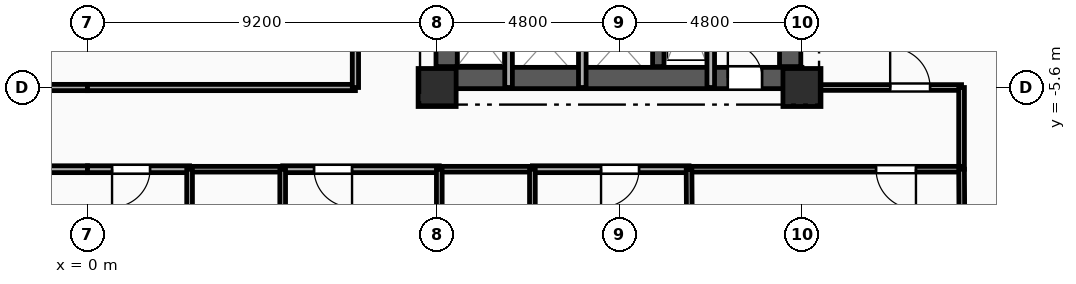
"""IFC4 building model, lengths in metres.
Left out: names, types, materials, properties, quantities, classifications, styles, units other than length and angle.
Written with IfcOpenShell. Run it as: python <this file> out.ifc"""

import sys

from ifc_helpers import new_model, si_unit, direction, frame, frame_2d, origin, origin_2d, place, context, subcontext, project, spatial, rectangle, extrude, element, fill, save


model = new_model("IFC4")
c1 = context("Model", 3, precision=1e-05, world=origin(), true_north=direction((0.0, 1.0)))
c2 = subcontext(c1, "Body", "Model", "MODEL_VIEW")
j1 = project(units=[si_unit("LENGTHUNIT", "METRE"), si_unit("PLANEANGLEUNIT", "RADIAN")], contexts=[c1])
p1 = place(None, origin())
s1 = spatial("IfcSite", under=j1, at=p1, CompositionType="ELEMENT")
p2 = place(p1, origin())
s2 = spatial("IfcBuilding", under=s1, at=p2, CompositionType="ELEMENT")
p3 = place(p2, frame((0.0, 0.0, 115.85)))
s3 = spatial("IfcBuildingStorey", under=s2, at=p3, CompositionType="ELEMENT", Elevation=115.85)
for number, where, z_axis, x_axis in (
    (1, (9.2, -5.6, 0.0), (0.0, 0.0, 1.0), (1.0, 0.0, 0.0)),
    (2, (18.8, -5.6, 0.0), (0.0, 0.0, 1.0), (1.0, 0.0, 0.0)),
):
    element("IfcColumn", number, at=place(p3, frame(where, z_axis=z_axis, x_axis=x_axis)), inside=s3, PredefinedType="COLUMN", context=c2, shape_type="SweptSolid", body=[
        extrude(rectangle(XDim=1.0, YDim=1.0, at=origin_2d()), origin(), (0.0, 0.0, 1.0), 3.35),
    ])
p4 = place(p3, frame((9.2, -5.35, 0.0), z_axis=(0.0, 0.0, 1.0), x_axis=(1.0, 0.0, 0.0)))
e3 = element("IfcWall", 3, at=p4, inside=s3, PredefinedType="SHEAR", context=c2, shape_type="SweptSolid", body=[
    extrude(rectangle(XDim=9.6, YDim=0.56, at=frame_2d((4.8, 0.0))), origin(), (0.0, 0.0, 1.0), 3.045),
])
p5 = place(p4, frame((7.65, 0.0, 0.0)))
e4 = element("IfcOpeningElement", 4, at=p5, cuts=e3, PredefinedType="OPENING", context=c2, shape_type="SweptSolid", body=[
    extrude(rectangle(XDim=0.9, YDim=2.1, at=frame_2d((0.45, 1.05))), frame((0.0, 0.29, 0.0), z_axis=(0.0, -1.0, 0.0), x_axis=(1.0, 0.0, 0.0)), (0.0, 0.0, 1.0), 0.58),
])
p6 = place(p3, frame((9.45, -5.05, 0.0), z_axis=(0.0, 0.0, 1.0), x_axis=(0.0, 1.0, 0.0)))
e5 = element("IfcWall", 5, at=p6, inside=s3, PredefinedType="SHEAR", context=c2, shape_type="SweptSolid", body=[
    extrude(rectangle(XDim=10.1, YDim=0.56, at=frame_2d((5.05, 0.0))), origin(), (0.0, 0.0, 1.0), 3.045),
])
p7 = place(p6, frame((7.15, 0.0, 0.0)))
e6 = element("IfcOpeningElement", 6, at=p7, cuts=e5, PredefinedType="OPENING", context=c2, shape_type="SweptSolid", body=[
    extrude(rectangle(XDim=0.9, YDim=2.1, at=frame_2d((0.45, 1.05))), frame((0.0, 0.29, 0.0), z_axis=(0.0, -1.0, 0.0), x_axis=(1.0, 0.0, 0.0)), (0.0, 0.0, 1.0), 0.58),
])
p8 = place(p6, frame((2.4, 0.0, 0.0)))
e7 = element("IfcOpeningElement", 7, at=p8, cuts=e5, PredefinedType="OPENING", context=c2, shape_type="SweptSolid", body=[
    extrude(rectangle(XDim=1.2, YDim=2.15, at=frame_2d((0.6, 1.075))), frame((0.0, 0.29, 0.0), z_axis=(0.0, -1.0, 0.0), x_axis=(1.0, 0.0, 0.0)), (0.0, 0.0, 1.0), 0.58),
])
p9 = place(p3, frame((18.49, -5.05, 0.0), z_axis=(0.0, 0.0, 1.0), x_axis=(0.0, 1.0, 0.0)))
e8 = element("IfcWall", 8, at=p9, inside=s3, PredefinedType="SHEAR", context=c2, shape_type="SweptSolid", body=[
    extrude(rectangle(XDim=10.1, YDim=0.56, at=frame_2d((5.05, 0.0))), origin(), (0.0, 0.0, 1.0), 3.045),
])
p10 = place(p3, frame((15.02, -5.05, 0.0), z_axis=(0.0, 0.0, 1.0), x_axis=(0.0, 1.0, 0.0)))
e9 = element("IfcWall", 9, at=p10, inside=s3, PredefinedType="SHEAR", context=c2, shape_type="SweptSolid", body=[
    extrude(rectangle(XDim=10.1, YDim=0.3, at=frame_2d((5.05, 0.0))), origin(), (0.0, 0.0, 1.0), 3.045),
])
p11 = place(p3, frame((16.4, -2.11, 0.0), z_axis=(0.0, 0.0, 1.0), x_axis=(0.0, -1.0, 0.0)))
e10 = element("IfcWall", 10, at=p11, inside=s3, PredefinedType="PARTITIONING", context=c2, shape_type="SweptSolid", body=[
    extrude(rectangle(XDim=3.49, YDim=0.2, at=frame_2d((1.745, 0.0))), origin(), (0.0, 0.0, 1.0), 3.045),
])
for number, where, z_axis, x_axis in (
    (11, (11.08, -5.6, 0.0), (0.0, 0.0, 1.0), (0.0, 1.0, 0.0)),
    (12, (13.02, -5.6, 0.0), (0.0, 0.0, 1.0), (0.0, 1.0, 0.0)),
):
    element("IfcWall", number, at=place(p3, frame(where, z_axis=z_axis, x_axis=x_axis)), inside=s3, PredefinedType="PARTITIONING", context=c2, shape_type="SweptSolid", body=[
        extrude(rectangle(XDim=2.25, YDim=0.2, at=frame_2d((1.125, 0.0))), origin(), (0.0, 0.0, 1.0), 3.045),
    ])
p12 = place(p3, frame((0.0, -7.75, 0.0), z_axis=(0.0, 0.0, 1.0), x_axis=(-1.0, 0.0, 0.0)))
e13 = element("IfcWall", 13, at=p12, inside=s3, PredefinedType="PARTITIONING", context=c2, shape_type="SweptSolid", body=[
    extrude(rectangle(XDim=1.436, YDim=0.18, at=frame_2d((0.718, 0.0))), origin(), (0.0, 0.0, 1.0), 3.045),
])
p13 = place(p3, frame((-7.05, -5.6, 0.0), z_axis=(0.0, 0.0, 1.0), x_axis=(1.0, 0.0, 0.0)))
e14 = element("IfcWall", 14, at=p13, inside=s3, PredefinedType="PARTITIONING", context=c2, shape_type="SweptSolid", body=[
    extrude(rectangle(XDim=7.05, YDim=0.165, at=frame_2d((3.525, 0.0))), origin(), (0.0, 0.0, 1.0), 2.53),
])
p14 = place(p13, frame((4.728, 0.0, 0.0)))
e15 = element("IfcOpeningElement", 15, at=p14, cuts=e14, PredefinedType="OPENING", context=c2, shape_type="SweptSolid", body=[
    extrude(rectangle(XDim=1.15, YDim=2.15, at=frame_2d((0.575, 1.075))), frame((0.0, 0.093, 0.0), z_axis=(0.0, -1.0, 0.0), x_axis=(1.0, 0.0, 0.0)), (0.0, 0.0, 1.0), 0.185),
])
p15 = place(p3, frame((18.8, -5.6, 0.0), z_axis=(0.0, 0.0, 1.0), x_axis=(1.0, 0.0, 0.0)))
e16 = element("IfcWall", 16, at=p15, inside=s3, PredefinedType="PARTITIONING", context=c2, shape_type="SweptSolid", body=[
    extrude(rectangle(XDim=4.2, YDim=0.15, at=frame_2d((2.1, 0.0))), origin(), (0.0, 0.0, 1.0), 2.53),
])
p16 = place(p15, frame((2.321, 0.0, 0.0)))
e17 = element("IfcOpeningElement", 17, at=p16, cuts=e16, PredefinedType="OPENING", context=c2, shape_type="SweptSolid", body=[
    extrude(rectangle(XDim=1.05, YDim=2.15, at=frame_2d((0.525, 1.075))), frame((0.0, 0.085, 0.0), z_axis=(0.0, -1.0, 0.0), x_axis=(1.0, 0.0, 0.0)), (0.0, 0.0, 1.0), 0.17),
])
p17 = place(p3, frame((23.0, -5.6, 0.0), z_axis=(0.0, 0.0, 1.0), x_axis=(0.0, -1.0, 0.0)))
e18 = element("IfcWall", 18, at=p17, inside=s3, PredefinedType="PARTITIONING", context=c2, shape_type="SweptSolid", body=[
    extrude(rectangle(XDim=2.15, YDim=0.15, at=frame_2d((1.075, 0.0))), origin(), (0.0, 0.0, 1.0), 3.045),
])
p18 = place(p3, frame((2.686, -7.75, 0.0), z_axis=(0.0, 0.0, 1.0), x_axis=(-1.0, 0.0, 0.0)))
e19 = element("IfcWall", 19, at=p18, inside=s3, PredefinedType="PARTITIONING", context=c2, shape_type="SweptSolid", body=[
    extrude(rectangle(XDim=2.686, YDim=0.18, at=frame_2d((1.343, 0.0))), origin(), (0.0, 0.0, 1.0), 3.045),
])
p19 = place(p18, frame((1.04, 0.0, 0.0)))
e20 = element("IfcOpeningElement", 20, at=p19, cuts=e19, PredefinedType="OPENING", context=c2, shape_type="SweptSolid", body=[
    extrude(rectangle(XDim=1.0, YDim=2.15, at=frame_2d((0.5, 1.075))), frame((0.0, 0.1, 0.0), z_axis=(0.0, -1.0, 0.0), x_axis=(1.0, 0.0, 0.0)), (0.0, 0.0, 1.0), 0.2),
])
p20 = place(p3, frame((9.257, -7.75, 0.0), z_axis=(0.0, 0.0, 1.0), x_axis=(-1.0, 0.0, 0.0)))
e21 = element("IfcWall", 21, at=p20, inside=s3, PredefinedType="PARTITIONING", context=c2, shape_type="SweptSolid", body=[
    extrude(rectangle(XDim=4.121, YDim=0.18, at=frame_2d((2.061, 0.0))), origin(), (0.0, 0.0, 1.0), 3.045),
])
p21 = place(p20, frame((2.296, 0.0, 0.0)))
e22 = element("IfcOpeningElement", 22, at=p21, cuts=e21, PredefinedType="OPENING", context=c2, shape_type="SweptSolid", body=[
    extrude(rectangle(XDim=1.0, YDim=2.15, at=frame_2d((0.5, 1.075))), frame((0.0, 0.1, 0.0), z_axis=(0.0, -1.0, 0.0), x_axis=(1.0, 0.0, 0.0)), (0.0, 0.0, 1.0), 0.2),
])
p22 = place(p3, frame((5.136, -7.75, 0.0), z_axis=(0.0, 0.0, 1.0), x_axis=(-1.0, 0.0, 0.0)))
e23 = element("IfcWall", 23, at=p22, inside=s3, PredefinedType="PLUMBINGWALL", context=c2, shape_type="SweptSolid", body=[
    extrude(rectangle(XDim=2.45, YDim=0.15, at=frame_2d((1.225, 0.0))), origin(), (0.0, 0.0, 1.0), 3.045),
])
p23 = place(p3, frame((15.829, -7.75, 0.0), z_axis=(0.0, 0.0, 1.0), x_axis=(-1.0, 0.0, 0.0)))
e24 = element("IfcWall", 24, at=p23, inside=s3, PredefinedType="PARTITIONING", context=c2, shape_type="SweptSolid", body=[
    extrude(rectangle(XDim=4.122, YDim=0.18, at=frame_2d((2.061, 0.0))), origin(), (0.0, 0.0, 1.0), 3.045),
])
p24 = place(p23, frame((1.316, 0.0, 0.0)))
e25 = element("IfcOpeningElement", 25, at=p24, cuts=e24, PredefinedType="OPENING", context=c2, shape_type="SweptSolid", body=[
    extrude(rectangle(XDim=1.0, YDim=2.15, at=frame_2d((0.5, 1.075))), frame((0.0, 0.1, 0.0), z_axis=(0.0, -1.0, 0.0), x_axis=(1.0, 0.0, 0.0)), (0.0, 0.0, 1.0), 0.2),
])
p25 = place(p3, frame((11.707, -7.75, 0.0), z_axis=(0.0, 0.0, 1.0), x_axis=(-1.0, 0.0, 0.0)))
e26 = element("IfcWall", 26, at=p25, inside=s3, PredefinedType="PLUMBINGWALL", context=c2, shape_type="SweptSolid", body=[
    extrude(rectangle(XDim=2.45, YDim=0.15, at=frame_2d((1.225, 0.0))), origin(), (0.0, 0.0, 1.0), 3.045),
])
p26 = place(p3, frame((23.0, -7.75, 0.0), z_axis=(0.0, 0.0, 1.0), x_axis=(-1.0, 0.0, 0.0)))
e27 = element("IfcWall", 27, at=p26, inside=s3, PredefinedType="PARTITIONING", context=c2, shape_type="SweptSolid", body=[
    extrude(rectangle(XDim=7.171, YDim=0.15, at=frame_2d((3.585, 0.0))), origin(), (0.0, 0.0, 1.0), 3.045),
])
p27 = place(p26, frame((1.2, 0.0, 0.0)))
e28 = element("IfcOpeningElement", 28, at=p27, cuts=e27, PredefinedType="OPENING", context=c2, shape_type="SweptSolid", body=[
    extrude(rectangle(XDim=1.05, YDim=2.15, at=frame_2d((0.525, 1.075))), frame((0.0, 0.085, 0.0), z_axis=(0.0, -1.0, 0.0), x_axis=(1.0, 0.0, 0.0)), (0.0, 0.0, 1.0), 0.17),
])
p28 = place(p3, frame((0.0, -5.6, 0.0), z_axis=(0.0, 0.0, 1.0), x_axis=(1.0, 0.0, 0.0)))
e29 = element("IfcWall", 29, at=p28, inside=s3, PredefinedType="PARTITIONING", context=c2, shape_type="SweptSolid", body=[
    extrude(rectangle(XDim=7.05, YDim=0.165, at=frame_2d((3.525, 0.0))), origin(), (0.0, 0.0, 1.0), 2.53),
])
p29 = place(p3, frame((7.05, -5.6, 0.0), z_axis=(0.0, 0.0, 1.0), x_axis=(0.0, 1.0, 0.0)))
e30 = element("IfcWall", 30, at=p29, inside=s3, PredefinedType="PARTITIONING", context=c2, shape_type="SweptSolid", body=[
    extrude(rectangle(XDim=7.05, YDim=0.165, at=frame_2d((3.525, 0.0))), origin(), (0.0, 0.0, 1.0), 3.045),
])
p30 = place(p3, frame((23.044, -14.749, 0.0), z_axis=(0.0, 0.0, 1.0), x_axis=(-0.006278653971, 0.999980289058, 0.0)))
e31 = element("IfcWall", 31, at=p30, inside=s3, PredefinedType="PARTITIONING", context=c2, shape_type="SweptSolid", body=[
    extrude(rectangle(XDim=6.999, YDim=0.15, at=frame_2d((3.5, 0.0))), origin(), (0.0, 0.0, 1.0), 3.045),
])
for number, where, z_axis, x_axis in (
    (32, (2.686, -7.75, 0.0), (0.0, 0.0, 1.0), (0.0, -1.0, 0.0)),
    (33, (5.136, -9.9, 0.0), (0.0, 0.0, 1.0), (0.0, 1.0, 0.0)),
    (34, (9.257, -7.75, 0.0), (0.0, 0.0, 1.0), (0.0, -1.0, 0.0)),
    (35, (11.707, -9.9, 0.0), (0.0, 0.0, 1.0), (0.0, 1.0, 0.0)),
):
    element("IfcWall", number, at=place(p3, frame(where, z_axis=z_axis, x_axis=x_axis)), inside=s3, PredefinedType="PLUMBINGWALL", context=c2, shape_type="SweptSolid", body=[
        extrude(rectangle(XDim=2.15, YDim=0.15, at=frame_2d((1.075, 0.0))), origin(), (0.0, 0.0, 1.0), 3.045),
    ])
p31 = place(p3, frame((15.829, -7.75, 0.0), z_axis=(0.0, 0.0, 1.0), x_axis=(0.00563681802, -0.999984113015, 0.0)))
e36 = element("IfcWall", 36, at=p31, inside=s3, PredefinedType="PARTITIONING", context=c2, shape_type="SweptSolid", body=[
    extrude(rectangle(XDim=7.753, YDim=0.15, at=frame_2d((3.876, 0.0))), origin(), (0.0, 0.0, 1.0), 3.045),
])
p32 = place(p5, origin())
e37 = element("IfcDoor", 37, at=p32, inside=s3, OperationType="SINGLE_SWING_LEFT", PredefinedType="DOOR", context=c2, shape_type="SweptSolid", body=[
    extrude(rectangle(XDim=0.9, YDim=2.1, at=frame_2d((0.45, 1.05))), frame((0.0, 0.025, 0.0), z_axis=(0.0, -1.0, 0.0), x_axis=(1.0, 0.0, 0.0)), (0.0, 0.0, 1.0), 0.05),
])
fill(e4, e37)
p33 = place(p16, origin())
e38 = element("IfcDoor", 38, at=p33, inside=s3, OperationType="SINGLE_SWING_LEFT", PredefinedType="DOOR", context=c2, shape_type="SweptSolid", body=[
    extrude(rectangle(XDim=1.05, YDim=2.15, at=frame_2d((0.525, 1.075))), frame((0.0, 0.025, 0.0), z_axis=(0.0, -1.0, 0.0), x_axis=(1.0, 0.0, 0.0)), (0.0, 0.0, 1.0), 0.05),
])
fill(e17, e38)
p34 = place(p19, origin())
e39 = element("IfcDoor", 39, at=p34, inside=s3, OperationType="SINGLE_SWING_RIGHT", PredefinedType="DOOR", context=c2, shape_type="SweptSolid", body=[
    extrude(rectangle(XDim=1.0, YDim=2.15, at=frame_2d((0.5, 1.075))), frame((0.0, 0.025, 0.0), z_axis=(0.0, -1.0, 0.0), x_axis=(1.0, 0.0, 0.0)), (0.0, 0.0, 1.0), 0.05),
])
fill(e20, e39)
p35 = place(p21, origin())
e40 = element("IfcDoor", 40, at=p35, inside=s3, OperationType="SINGLE_SWING_LEFT", PredefinedType="DOOR", context=c2, shape_type="SweptSolid", body=[
    extrude(rectangle(XDim=1.0, YDim=2.15, at=frame_2d((0.5, 1.075))), frame((0.0, 0.025, 0.0), z_axis=(0.0, -1.0, 0.0), x_axis=(1.0, 0.0, 0.0)), (0.0, 0.0, 1.0), 0.05),
])
fill(e22, e40)
p36 = place(p24, origin())
e41 = element("IfcDoor", 41, at=p36, inside=s3, OperationType="SINGLE_SWING_RIGHT", PredefinedType="DOOR", context=c2, shape_type="SweptSolid", body=[
    extrude(rectangle(XDim=1.0, YDim=2.15, at=frame_2d((0.5, 1.075))), frame((0.0, 0.025, 0.0), z_axis=(0.0, -1.0, 0.0), x_axis=(1.0, 0.0, 0.0)), (0.0, 0.0, 1.0), 0.05),
])
fill(e25, e41)
p37 = place(p27, origin())
e42 = element("IfcDoor", 42, at=p37, inside=s3, OperationType="SINGLE_SWING_LEFT", PredefinedType="DOOR", context=c2, shape_type="SweptSolid", body=[
    extrude(rectangle(XDim=1.05, YDim=2.15, at=frame_2d((0.525, 1.075))), frame((0.0, 0.025, 0.0), z_axis=(0.0, -1.0, 0.0), x_axis=(1.0, 0.0, 0.0)), (0.0, 0.0, 1.0), 0.05),
])
fill(e28, e42)
save(model, sys.argv[1])
